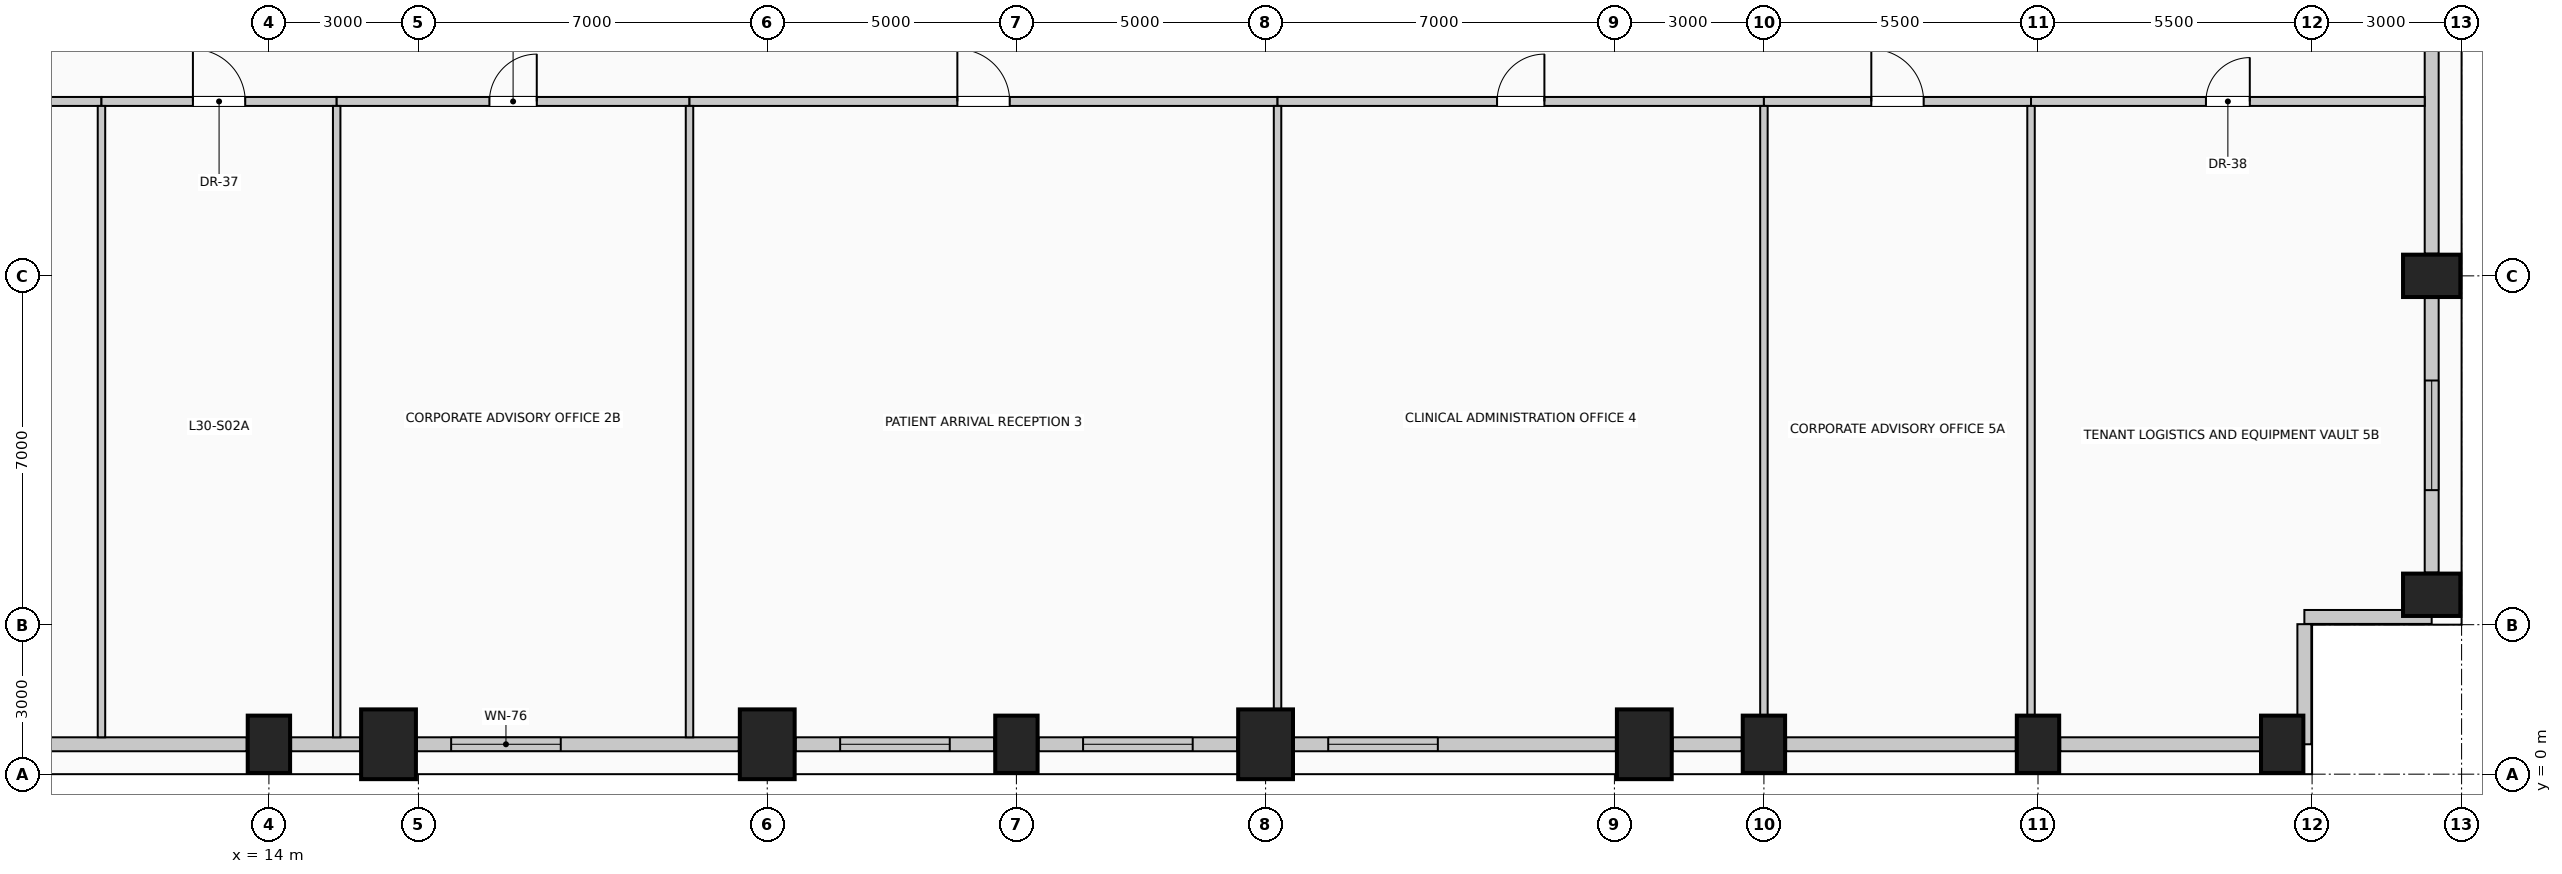
"""IFC4 building model, lengths in metres.
Left out: names, types, materials, properties, quantities, classifications, styles, units other than length and angle.
Written with IfcOpenShell. Run it as: python <this file> out.ifc"""

import sys

from ifc_helpers import new_model, si_unit, direction, frame, frame_2d, origin, origin_2d, place, context, subcontext, project, spatial, rectangle, extrude, element, fill, save


model = new_model("IFC4")
c1 = context("Model", 3, precision=1e-05, world=origin(), true_north=direction((0.0, 1.0)))
c2 = subcontext(c1, "Body", "Model", "MODEL_VIEW")
j1 = project(units=[si_unit("LENGTHUNIT", "METRE"), si_unit("PLANEANGLEUNIT", "RADIAN")], contexts=[c1])
p1 = place(None, origin())
s1 = spatial("IfcSite", under=j1, at=p1, CompositionType="ELEMENT")
p2 = place(p1, origin())
s2 = spatial("IfcBuilding", under=s1, at=p2, CompositionType="ELEMENT")
p3 = place(p2, frame((0.0, 0.0, 124.6)))
s3 = spatial("IfcBuildingStorey", under=s2, at=p3, CompositionType="ELEMENT", Elevation=124.6)
p4 = place(p3, frame((14.0, 0.6, 0.0), z_axis=(0.0, 0.0, 1.0), x_axis=(1.0, 0.0, 0.0)))
e1 = element("IfcColumn", 1, at=p4, inside=s3, PredefinedType="COLUMN", context=c2, shape_type="SweptSolid", body=[
    extrude(rectangle(XDim=0.85, YDim=1.15, at=origin_2d()), origin(), (0.0, 0.0, 1.0), 4.0),
])
for number, where, z_axis, x_axis in (
    (2, (16.4, 0.6, 0.0), (0.0, 0.0, 1.0), (1.0, 0.0, 0.0)),
    (3, (24.0, 0.6, 0.0), (0.0, 0.0, 1.0), (1.0, 0.0, 0.0)),
):
    element("IfcColumn", number, at=place(p3, frame(where, z_axis=z_axis, x_axis=x_axis)), inside=s3, PredefinedType="COLUMN", context=c2, shape_type="SweptSolid", body=[
        extrude(rectangle(XDim=1.1, YDim=1.4, at=origin_2d()), origin(), (0.0, 0.0, 1.0), 4.0),
    ])
p5 = place(p3, frame((29.0, 0.6, 0.0), z_axis=(0.0, 0.0, 1.0), x_axis=(1.0, 0.0, 0.0)))
e4 = element("IfcColumn", 4, at=p5, inside=s3, PredefinedType="COLUMN", context=c2, shape_type="SweptSolid", body=[
    extrude(rectangle(XDim=0.85, YDim=1.15, at=origin_2d()), origin(), (0.0, 0.0, 1.0), 4.0),
])
for number, where, z_axis, x_axis in (
    (5, (34.0, 0.6, 0.0), (0.0, 0.0, 1.0), (1.0, 0.0, 0.0)),
    (6, (41.6, 0.6, 0.0), (0.0, 0.0, 1.0), (1.0, 0.0, 0.0)),
):
    element("IfcColumn", number, at=place(p3, frame(where, z_axis=z_axis, x_axis=x_axis)), inside=s3, PredefinedType="COLUMN", context=c2, shape_type="SweptSolid", body=[
        extrude(rectangle(XDim=1.1, YDim=1.4, at=origin_2d()), origin(), (0.0, 0.0, 1.0), 4.0),
    ])
for number, where, z_axis, x_axis in (
    (7, (44.0, 0.6, 0.0), (0.0, 0.0, 1.0), (1.0, 0.0, 0.0)),
    (8, (49.5, 0.6, 0.0), (0.0, 0.0, 1.0), (1.0, 0.0, 0.0)),
    (9, (54.4, 0.6, 0.0), (0.0, 0.0, 1.0), (1.0, 0.0, 0.0)),
    (10, (57.4, 3.6, 0.0), (0.0, 0.0, 1.0), (0.0, 1.0, 0.0)),
    (11, (57.4, 10.0, 0.0), (0.0, 0.0, 1.0), (0.0, 1.0, 0.0)),
):
    element("IfcColumn", number, at=place(p3, frame(where, z_axis=z_axis, x_axis=x_axis)), inside=s3, PredefinedType="COLUMN", context=c2, shape_type="SweptSolid", body=[
        extrude(rectangle(XDim=0.85, YDim=1.15, at=origin_2d()), origin(), (0.0, 0.0, 1.0), 4.0),
    ])
p6 = place(p3, frame((13.555, 0.6, 0.0), z_axis=(0.0, 0.0, 1.0), x_axis=(-1.0, 0.0, 0.0)))
e12 = element("IfcWall", 12, at=p6, inside=s3, PredefinedType="SOLIDWALL", context=c2, shape_type="SweptSolid", body=[
    extrude(rectangle(XDim=4.61, YDim=0.28, at=frame_2d((2.305, 0.0))), origin(), (0.0, 0.0, 1.0), 2.875),
])
p7 = place(p3, frame((15.83, 0.6, 0.0), z_axis=(0.0, 0.0, 1.0), x_axis=(-1.0, 0.0, 0.0)))
e13 = element("IfcWall", 13, at=p7, inside=s3, PredefinedType="SOLIDWALL", context=c2, shape_type="SweptSolid", body=[
    extrude(rectangle(XDim=1.385, YDim=0.28, at=frame_2d((0.692, 0.0))), origin(), (0.0, 0.0, 1.0), 2.875),
])
p8 = place(p3, frame((23.43, 0.6, 0.0), z_axis=(0.0, 0.0, 1.0), x_axis=(-1.0, 0.0, 0.0)))
e14 = element("IfcWall", 14, at=p8, inside=s3, PredefinedType="SOLIDWALL", context=c2, shape_type="SweptSolid", body=[
    extrude(rectangle(XDim=6.46, YDim=0.28, at=frame_2d((3.23, 0.0))), origin(), (0.0, 0.0, 1.0), 2.875),
])
p9 = place(p8, frame((3.573, 0.0, 0.5)))
e15 = element("IfcOpeningElement", 15, at=p9, cuts=e14, PredefinedType="OPENING", context=c2, shape_type="SweptSolid", body=[
    extrude(rectangle(XDim=2.2, YDim=1.95, at=frame_2d((1.1, 0.975))), frame((0.0, 0.15, 0.0), z_axis=(0.0, -1.0, 0.0), x_axis=(1.0, 0.0, 0.0)), (0.0, 0.0, 1.0), 0.3),
])
p10 = place(p3, frame((28.555, 0.6, 0.0), z_axis=(0.0, 0.0, 1.0), x_axis=(-1.0, 0.0, 0.0)))
e16 = element("IfcWall", 16, at=p10, inside=s3, PredefinedType="SOLIDWALL", context=c2, shape_type="SweptSolid", body=[
    extrude(rectangle(XDim=3.985, YDim=0.28, at=frame_2d((1.992, 0.0))), origin(), (0.0, 0.0, 1.0), 2.875),
])
p11 = place(p10, frame((0.893, 0.0, 0.5)))
e17 = element("IfcOpeningElement", 17, at=p11, cuts=e16, PredefinedType="OPENING", context=c2, shape_type="SweptSolid", body=[
    extrude(rectangle(XDim=2.2, YDim=1.95, at=frame_2d((1.1, 0.975))), frame((0.0, 0.15, 0.0), z_axis=(0.0, -1.0, 0.0), x_axis=(1.0, 0.0, 0.0)), (0.0, 0.0, 1.0), 0.3),
])
p12 = place(p3, frame((33.43, 0.6, 0.0), z_axis=(0.0, 0.0, 1.0), x_axis=(-1.0, 0.0, 0.0)))
e18 = element("IfcWall", 18, at=p12, inside=s3, PredefinedType="SOLIDWALL", context=c2, shape_type="SweptSolid", body=[
    extrude(rectangle(XDim=3.985, YDim=0.28, at=frame_2d((1.992, 0.0))), origin(), (0.0, 0.0, 1.0), 2.875),
])
p13 = place(p12, frame((0.893, 0.0, 0.5)))
e19 = element("IfcOpeningElement", 19, at=p13, cuts=e18, PredefinedType="OPENING", context=c2, shape_type="SweptSolid", body=[
    extrude(rectangle(XDim=2.2, YDim=1.95, at=frame_2d((1.1, 0.975))), frame((0.0, 0.15, 0.0), z_axis=(0.0, -1.0, 0.0), x_axis=(1.0, 0.0, 0.0)), (0.0, 0.0, 1.0), 0.3),
])
p14 = place(p3, frame((41.03, 0.6, 0.0), z_axis=(0.0, 0.0, 1.0), x_axis=(-1.0, 0.0, 0.0)))
e20 = element("IfcWall", 20, at=p14, inside=s3, PredefinedType="SOLIDWALL", context=c2, shape_type="SweptSolid", body=[
    extrude(rectangle(XDim=6.46, YDim=0.28, at=frame_2d((3.23, 0.0))), origin(), (0.0, 0.0, 1.0), 2.875),
])
p15 = place(p14, frame((3.573, 0.0, 0.5)))
e21 = element("IfcOpeningElement", 21, at=p15, cuts=e20, PredefinedType="OPENING", context=c2, shape_type="SweptSolid", body=[
    extrude(rectangle(XDim=2.2, YDim=1.95, at=frame_2d((1.1, 0.975))), frame((0.0, 0.15, 0.0), z_axis=(0.0, -1.0, 0.0), x_axis=(1.0, 0.0, 0.0)), (0.0, 0.0, 1.0), 0.3),
])
p16 = place(p3, frame((43.555, 0.6, 0.0), z_axis=(0.0, 0.0, 1.0), x_axis=(-1.0, 0.0, 0.0)))
e22 = element("IfcWall", 22, at=p16, inside=s3, PredefinedType="SOLIDWALL", context=c2, shape_type="SweptSolid", body=[
    extrude(rectangle(XDim=1.385, YDim=0.28, at=frame_2d((0.692, 0.0))), origin(), (0.0, 0.0, 1.0), 2.875),
])
p17 = place(p3, frame((49.055, 0.6, 0.0), z_axis=(0.0, 0.0, 1.0), x_axis=(-1.0, 0.0, 0.0)))
e23 = element("IfcWall", 23, at=p17, inside=s3, PredefinedType="SOLIDWALL", context=c2, shape_type="SweptSolid", body=[
    extrude(rectangle(XDim=4.61, YDim=0.28, at=frame_2d((2.305, 0.0))), origin(), (0.0, 0.0, 1.0), 2.875),
])
p18 = place(p3, frame((53.955, 0.6, 0.0), z_axis=(0.0, 0.0, 1.0), x_axis=(-1.0, 0.0, 0.0)))
e24 = element("IfcWall", 24, at=p18, inside=s3, PredefinedType="SOLIDWALL", context=c2, shape_type="SweptSolid", body=[
    extrude(rectangle(XDim=4.01, YDim=0.28, at=frame_2d((2.005, 0.0))), origin(), (0.0, 0.0, 1.0), 2.875),
])
p19 = place(p3, frame((57.4, 9.555, 0.0), z_axis=(0.0, 0.0, 1.0), x_axis=(0.0, -1.0, 0.0)))
e25 = element("IfcWall", 25, at=p19, inside=s3, PredefinedType="SOLIDWALL", context=c2, shape_type="SweptSolid", body=[
    extrude(rectangle(XDim=5.51, YDim=0.28, at=frame_2d((2.755, 0.0))), origin(), (0.0, 0.0, 1.0), 2.875),
])
p20 = place(p19, frame((1.655, 0.0, 0.5)))
e26 = element("IfcOpeningElement", 26, at=p20, cuts=e25, PredefinedType="OPENING", context=c2, shape_type="SweptSolid", body=[
    extrude(rectangle(XDim=2.2, YDim=1.95, at=frame_2d((1.1, 0.975))), frame((0.0, 0.15, 0.0), z_axis=(0.0, -1.0, 0.0), x_axis=(1.0, 0.0, 0.0)), (0.0, 0.0, 1.0), 0.3),
])
p21 = place(p3, frame((57.4, 17.555, 0.0), z_axis=(0.0, 0.0, 1.0), x_axis=(0.0, -1.0, 0.0)))
e27 = element("IfcWall", 27, at=p21, inside=s3, PredefinedType="SOLIDWALL", context=c2, shape_type="SweptSolid", body=[
    extrude(rectangle(XDim=7.11, YDim=0.28, at=frame_2d((3.555, 0.0))), origin(), (0.0, 0.0, 1.0), 2.875),
])
p22 = place(p3, frame((57.4, 3.155, 0.0), z_axis=(0.0, 0.0, 1.0), x_axis=(-1.0, 0.0, 0.0)))
e28 = element("IfcWall", 28, at=p22, inside=s3, PredefinedType="SOLIDWALL", context=c2, shape_type="SweptSolid", body=[
    extrude(rectangle(XDim=2.555, YDim=0.28, at=frame_2d((1.277, 0.0))), origin(), (0.0, 0.0, 1.0), 3.725),
])
p23 = place(p3, frame((54.845, 3.01, 0.0), z_axis=(0.0, 0.0, 1.0), x_axis=(0.0, -1.0, 0.0)))
e29 = element("IfcWall", 29, at=p23, inside=s3, PredefinedType="SOLIDWALL", context=c2, shape_type="SweptSolid", body=[
    extrude(rectangle(XDim=2.41, YDim=0.28, at=frame_2d((1.205, 0.0))), origin(), (0.0, 0.0, 1.0), 3.725),
])
p24 = place(p3, frame((0.74, 13.5, 0.0), z_axis=(0.0, 0.0, 1.0), x_axis=(1.0, 0.0, 0.0)))
e30 = element("IfcWall", 30, at=p24, inside=s3, PredefinedType="PARTITIONING", context=c2, shape_type="SweptSolid", body=[
    extrude(rectangle(XDim=9.9, YDim=0.18, at=frame_2d((4.95, 0.0))), origin(), (0.0, 0.0, 1.0), 3.725),
])
p25 = place(p24, frame((4.475, 0.0, 0.0)))
e31 = element("IfcOpeningElement", 31, at=p25, cuts=e30, PredefinedType="OPENING", context=c2, shape_type="SweptSolid", body=[
    extrude(rectangle(XDim=0.95, YDim=2.15, at=frame_2d((0.475, 1.075))), frame((0.0, 0.1, 0.0), z_axis=(0.0, -1.0, 0.0), x_axis=(1.0, 0.0, 0.0)), (0.0, 0.0, 1.0), 0.2),
])
p26 = place(p3, frame((10.64, 13.5, 0.0), z_axis=(0.0, 0.0, 1.0), x_axis=(1.0, 0.0, 0.0)))
e32 = element("IfcWall", 32, at=p26, inside=s3, PredefinedType="PARTITIONING", context=c2, shape_type="SweptSolid", body=[
    extrude(rectangle(XDim=4.72, YDim=0.18, at=frame_2d((2.36, 0.0))), origin(), (0.0, 0.0, 1.0), 3.725),
])
p27 = place(p26, frame((1.835, 0.0, 0.0)))
e33 = element("IfcOpeningElement", 33, at=p27, cuts=e32, PredefinedType="OPENING", context=c2, shape_type="SweptSolid", body=[
    extrude(rectangle(XDim=1.05, YDim=2.15, at=frame_2d((0.525, 1.075))), frame((0.0, 0.1, 0.0), z_axis=(0.0, -1.0, 0.0), x_axis=(1.0, 0.0, 0.0)), (0.0, 0.0, 1.0), 0.2),
])
p28 = place(p3, frame((15.36, 13.5, 0.0), z_axis=(0.0, 0.0, 1.0), x_axis=(1.0, 0.0, 0.0)))
e34 = element("IfcWall", 34, at=p28, inside=s3, PredefinedType="PARTITIONING", context=c2, shape_type="SweptSolid", body=[
    extrude(rectangle(XDim=7.08, YDim=0.18, at=frame_2d((3.54, 0.0))), origin(), (0.0, 0.0, 1.0), 3.725),
])
p29 = place(p28, frame((3.065, 0.0, 0.0)))
e35 = element("IfcOpeningElement", 35, at=p29, cuts=e34, PredefinedType="OPENING", context=c2, shape_type="SweptSolid", body=[
    extrude(rectangle(XDim=0.95, YDim=2.15, at=frame_2d((0.475, 1.075))), frame((0.0, 0.1, 0.0), z_axis=(0.0, -1.0, 0.0), x_axis=(1.0, 0.0, 0.0)), (0.0, 0.0, 1.0), 0.2),
])
p30 = place(p3, frame((22.44, 13.5, 0.0), z_axis=(0.0, 0.0, 1.0), x_axis=(1.0, 0.0, 0.0)))
e36 = element("IfcWall", 36, at=p30, inside=s3, PredefinedType="PARTITIONING", context=c2, shape_type="SweptSolid", body=[
    extrude(rectangle(XDim=11.8, YDim=0.18, at=frame_2d((5.9, 0.0))), origin(), (0.0, 0.0, 1.0), 3.725),
])
p31 = place(p30, frame((5.375, 0.0, 0.0)))
e37 = element("IfcOpeningElement", 37, at=p31, cuts=e36, PredefinedType="OPENING", context=c2, shape_type="SweptSolid", body=[
    extrude(rectangle(XDim=1.05, YDim=2.15, at=frame_2d((0.525, 1.075))), frame((0.0, 0.1, 0.0), z_axis=(0.0, -1.0, 0.0), x_axis=(1.0, 0.0, 0.0)), (0.0, 0.0, 1.0), 0.2),
])
p32 = place(p3, frame((34.24, 13.5, 0.0), z_axis=(0.0, 0.0, 1.0), x_axis=(1.0, 0.0, 0.0)))
e38 = element("IfcWall", 38, at=p32, inside=s3, PredefinedType="PARTITIONING", context=c2, shape_type="SweptSolid", body=[
    extrude(rectangle(XDim=9.76, YDim=0.18, at=frame_2d((4.88, 0.0))), origin(), (0.0, 0.0, 1.0), 3.725),
])
p33 = place(p32, frame((4.405, 0.0, 0.0)))
e39 = element("IfcOpeningElement", 39, at=p33, cuts=e38, PredefinedType="OPENING", context=c2, shape_type="SweptSolid", body=[
    extrude(rectangle(XDim=0.95, YDim=2.15, at=frame_2d((0.475, 1.075))), frame((0.0, 0.1, 0.0), z_axis=(0.0, -1.0, 0.0), x_axis=(1.0, 0.0, 0.0)), (0.0, 0.0, 1.0), 0.2),
])
p34 = place(p3, frame((44.0, 13.5, 0.0), z_axis=(0.0, 0.0, 1.0), x_axis=(1.0, 0.0, 0.0)))
e40 = element("IfcWall", 40, at=p34, inside=s3, PredefinedType="PARTITIONING", context=c2, shape_type="SweptSolid", body=[
    extrude(rectangle(XDim=5.36, YDim=0.18, at=frame_2d((2.68, 0.0))), origin(), (0.0, 0.0, 1.0), 3.725),
])
p35 = place(p34, frame((2.155, 0.0, 0.0)))
e41 = element("IfcOpeningElement", 41, at=p35, cuts=e40, PredefinedType="OPENING", context=c2, shape_type="SweptSolid", body=[
    extrude(rectangle(XDim=1.05, YDim=2.15, at=frame_2d((0.525, 1.075))), frame((0.0, 0.1, 0.0), z_axis=(0.0, -1.0, 0.0), x_axis=(1.0, 0.0, 0.0)), (0.0, 0.0, 1.0), 0.2),
])
p36 = place(p3, frame((49.36, 13.5, 0.0), z_axis=(0.0, 0.0, 1.0), x_axis=(1.0, 0.0, 0.0)))
e42 = element("IfcWall", 42, at=p36, inside=s3, PredefinedType="PARTITIONING", context=c2, shape_type="SweptSolid", body=[
    extrude(rectangle(XDim=7.9, YDim=0.18, at=frame_2d((3.95, 0.0))), origin(), (0.0, 0.0, 1.0), 3.725),
])
p37 = place(p36, frame((3.51, 0.0, 0.0)))
e43 = element("IfcOpeningElement", 43, at=p37, cuts=e42, PredefinedType="OPENING", context=c2, shape_type="SweptSolid", body=[
    extrude(rectangle(XDim=0.88, YDim=2.1, at=frame_2d((0.44, 1.05))), frame((0.0, 0.1, 0.0), z_axis=(0.0, -1.0, 0.0), x_axis=(1.0, 0.0, 0.0)), (0.0, 0.0, 1.0), 0.2),
])
for number, where, z_axis, x_axis in (
    (44, (10.64, 0.74, 0.0), (0.0, 0.0, 1.0), (0.0, 1.0, 0.0)),
    (45, (15.36, 0.74, 0.0), (0.0, 0.0, 1.0), (0.0, 1.0, 0.0)),
    (46, (22.44, 0.74, 0.0), (0.0, 0.0, 1.0), (0.0, 1.0, 0.0)),
):
    element("IfcWall", number, at=place(p3, frame(where, z_axis=z_axis, x_axis=x_axis)), inside=s3, PredefinedType="PARTITIONING", context=c2, shape_type="SweptSolid", body=[
        extrude(rectangle(XDim=12.67, YDim=0.15, at=frame_2d((6.335, 0.0))), origin(), (0.0, 0.0, 1.0), 3.725),
    ])
p38 = place(p3, frame((34.24, 1.3, 0.0), z_axis=(0.0, 0.0, 1.0), x_axis=(0.0, 1.0, 0.0)))
e47 = element("IfcWall", 47, at=p38, inside=s3, PredefinedType="PARTITIONING", context=c2, shape_type="SweptSolid", body=[
    extrude(rectangle(XDim=12.11, YDim=0.15, at=frame_2d((6.055, 0.0))), origin(), (0.0, 0.0, 1.0), 3.725),
])
for number, where, z_axis, x_axis in (
    (48, (44.0, 1.175, 0.0), (0.0, 0.0, 1.0), (0.0, 1.0, 0.0)),
    (49, (49.36, 1.175, 0.0), (0.0, 0.0, 1.0), (0.0, 1.0, 0.0)),
):
    element("IfcWall", number, at=place(p3, frame(where, z_axis=z_axis, x_axis=x_axis)), inside=s3, PredefinedType="PARTITIONING", context=c2, shape_type="SweptSolid", body=[
        extrude(rectangle(XDim=12.235, YDim=0.15, at=frame_2d((6.117, 0.0))), origin(), (0.0, 0.0, 1.0), 3.725),
    ])
p39 = place(p9, origin())
e50 = element("IfcWindow", 50, at=p39, inside=s3, PartitioningType="SINGLE_PANEL", PredefinedType="WINDOW", context=c2, shape_type="SweptSolid", body=[
    extrude(rectangle(XDim=2.2, YDim=1.95, at=frame_2d((1.1, 0.975))), frame((0.0, 0.03, 0.0), z_axis=(0.0, -1.0, 0.0), x_axis=(1.0, 0.0, 0.0)), (0.0, 0.0, 1.0), 0.06),
])
fill(e15, e50)
p40 = place(p11, origin())
e51 = element("IfcWindow", 51, at=p40, inside=s3, PartitioningType="SINGLE_PANEL", PredefinedType="WINDOW", context=c2, shape_type="SweptSolid", body=[
    extrude(rectangle(XDim=2.2, YDim=1.95, at=frame_2d((1.1, 0.975))), frame((0.0, 0.03, 0.0), z_axis=(0.0, -1.0, 0.0), x_axis=(1.0, 0.0, 0.0)), (0.0, 0.0, 1.0), 0.06),
])
fill(e17, e51)
p41 = place(p13, origin())
e52 = element("IfcWindow", 52, at=p41, inside=s3, PartitioningType="SINGLE_PANEL", PredefinedType="WINDOW", context=c2, shape_type="SweptSolid", body=[
    extrude(rectangle(XDim=2.2, YDim=1.95, at=frame_2d((1.1, 0.975))), frame((0.0, 0.03, 0.0), z_axis=(0.0, -1.0, 0.0), x_axis=(1.0, 0.0, 0.0)), (0.0, 0.0, 1.0), 0.06),
])
fill(e19, e52)
p42 = place(p15, origin())
e53 = element("IfcWindow", 53, at=p42, inside=s3, PartitioningType="SINGLE_PANEL", PredefinedType="WINDOW", context=c2, shape_type="SweptSolid", body=[
    extrude(rectangle(XDim=2.2, YDim=1.95, at=frame_2d((1.1, 0.975))), frame((0.0, 0.03, 0.0), z_axis=(0.0, -1.0, 0.0), x_axis=(1.0, 0.0, 0.0)), (0.0, 0.0, 1.0), 0.06),
])
fill(e21, e53)
p43 = place(p20, origin())
e54 = element("IfcWindow", 54, at=p43, inside=s3, PartitioningType="SINGLE_PANEL", PredefinedType="WINDOW", context=c2, shape_type="SweptSolid", body=[
    extrude(rectangle(XDim=2.2, YDim=1.95, at=frame_2d((1.1, 0.975))), frame((0.0, 0.03, 0.0), z_axis=(0.0, -1.0, 0.0), x_axis=(1.0, 0.0, 0.0)), (0.0, 0.0, 1.0), 0.06),
])
fill(e26, e54)
p44 = place(p27, origin())
e55 = element("IfcDoor", 55, at=p44, inside=s3, OperationType="SINGLE_SWING_LEFT", PredefinedType="DOOR", context=c2, shape_type="SweptSolid", body=[
    extrude(rectangle(XDim=1.05, YDim=2.15, at=frame_2d((0.525, 1.075))), frame((0.0, 0.025, 0.0), z_axis=(0.0, -1.0, 0.0), x_axis=(1.0, 0.0, 0.0)), (0.0, 0.0, 1.0), 0.05),
])
fill(e33, e55)
p45 = place(p29, origin())
e56 = element("IfcDoor", 56, at=p45, inside=s3, OperationType="SINGLE_SWING_RIGHT", PredefinedType="DOOR", context=c2, shape_type="SweptSolid", body=[
    extrude(rectangle(XDim=0.95, YDim=2.15, at=frame_2d((0.475, 1.075))), frame((0.0, 0.025, 0.0), z_axis=(0.0, -1.0, 0.0), x_axis=(1.0, 0.0, 0.0)), (0.0, 0.0, 1.0), 0.05),
])
fill(e35, e56)
p46 = place(p31, origin())
e57 = element("IfcDoor", 57, at=p46, inside=s3, OperationType="SINGLE_SWING_LEFT", PredefinedType="DOOR", context=c2, shape_type="SweptSolid", body=[
    extrude(rectangle(XDim=1.05, YDim=2.15, at=frame_2d((0.525, 1.075))), frame((0.0, 0.025, 0.0), z_axis=(0.0, -1.0, 0.0), x_axis=(1.0, 0.0, 0.0)), (0.0, 0.0, 1.0), 0.05),
])
fill(e37, e57)
p47 = place(p33, origin())
e58 = element("IfcDoor", 58, at=p47, inside=s3, OperationType="SINGLE_SWING_RIGHT", PredefinedType="DOOR", context=c2, shape_type="SweptSolid", body=[
    extrude(rectangle(XDim=0.95, YDim=2.15, at=frame_2d((0.475, 1.075))), frame((0.0, 0.025, 0.0), z_axis=(0.0, -1.0, 0.0), x_axis=(1.0, 0.0, 0.0)), (0.0, 0.0, 1.0), 0.05),
])
fill(e39, e58)
p48 = place(p35, origin())
e59 = element("IfcDoor", 59, at=p48, inside=s3, OperationType="SINGLE_SWING_LEFT", PredefinedType="DOOR", context=c2, shape_type="SweptSolid", body=[
    extrude(rectangle(XDim=1.05, YDim=2.15, at=frame_2d((0.525, 1.075))), frame((0.0, 0.025, 0.0), z_axis=(0.0, -1.0, 0.0), x_axis=(1.0, 0.0, 0.0)), (0.0, 0.0, 1.0), 0.05),
])
fill(e41, e59)
p49 = place(p37, origin())
e60 = element("IfcDoor", 60, at=p49, inside=s3, OperationType="SINGLE_SWING_RIGHT", PredefinedType="DOOR", context=c2, shape_type="SweptSolid", body=[
    extrude(rectangle(XDim=0.88, YDim=2.1, at=frame_2d((0.44, 1.05))), frame((0.0, 0.025, 0.0), z_axis=(0.0, -1.0, 0.0), x_axis=(1.0, 0.0, 0.0)), (0.0, 0.0, 1.0), 0.05),
])
fill(e43, e60)
save(model, sys.argv[1])
